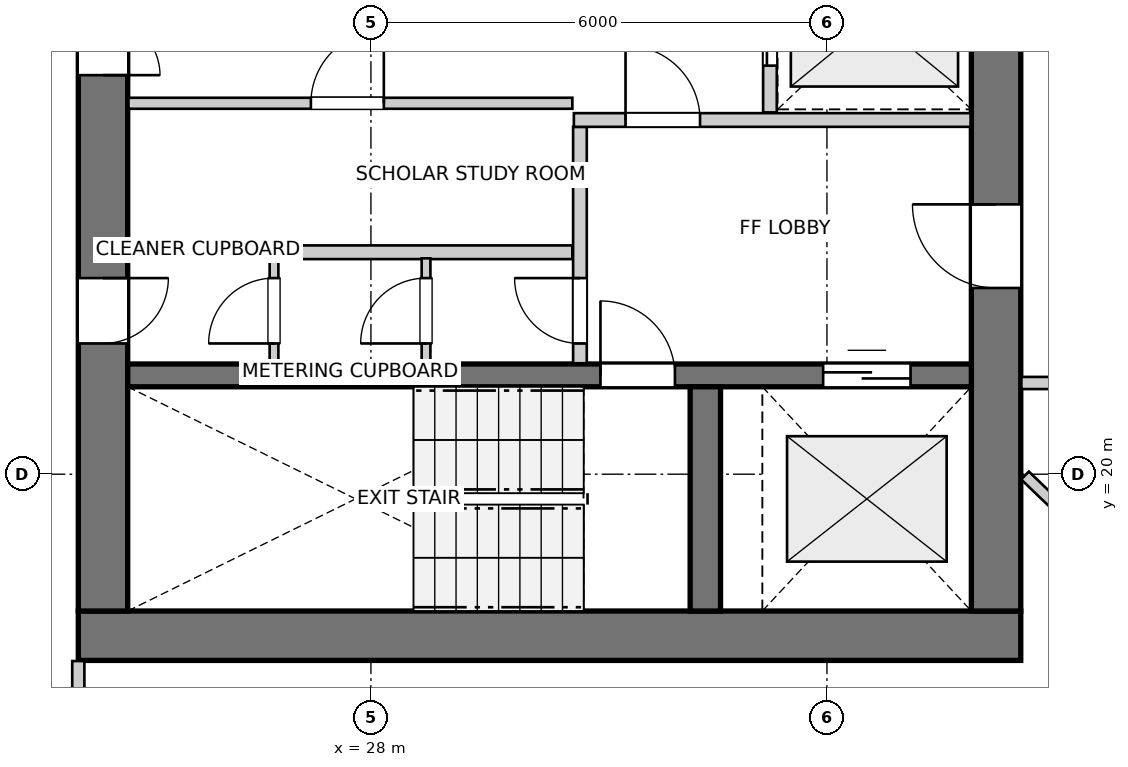
"""IFC4 building model, lengths in metres.
Left out: names, types, materials, properties, quantities, classifications, styles, units other than length and angle.
Written with IfcOpenShell. Run it as: python <this file> out.ifc"""

import sys

from ifc_helpers import new_model, si_unit, direction, frame, frame_2d, origin, place, context, subcontext, project, spatial, rectangle, extrude, source, transform, mapped, element, fill, save


model = new_model("IFC4")
c1 = context("Model", 3, precision=1e-05, world=origin(), true_north=direction((0.0, 1.0)))
c2 = subcontext(c1, "Body", "Model", "MODEL_VIEW")
j1 = project(units=[si_unit("LENGTHUNIT", "METRE"), si_unit("PLANEANGLEUNIT", "RADIAN")], contexts=[c1])
p1 = place(None, origin())
s1 = spatial("IfcSite", under=j1, at=p1, CompositionType="ELEMENT")
p2 = place(p1, origin())
s2 = spatial("IfcBuilding", under=s1, at=p2, CompositionType="ELEMENT")
p3 = place(p2, frame((0.0, 0.0, 152.2)))
s3 = spatial("IfcBuildingStorey", under=s2, at=p3, CompositionType="ELEMENT", Elevation=152.2)
p4 = place(p3, frame((24.15, 17.875, 0.0), z_axis=(0.0, 0.0, 1.0), x_axis=(1.0, 0.0, 0.0)))
e1 = element("IfcWall", 1, at=p4, inside=s3, PredefinedType="SHEAR", context=c2, shape_type="SweptSolid", body=[
    extrude(rectangle(XDim=12.4, YDim=0.65, at=frame_2d((6.2, 0.0))), origin(), (0.0, 0.0, 1.0), 2.935),
])
p5 = place(p3, frame((24.475, 33.8, 0.0), z_axis=(0.0, 0.0, 1.0), x_axis=(0.0, -1.0, 0.0)))
e2 = element("IfcWall", 2, at=p5, inside=s3, PredefinedType="SHEAR", context=c2, shape_type="SweptSolid", body=[
    extrude(rectangle(XDim=15.6, YDim=0.65, at=frame_2d((7.8, 0.0))), origin(), (0.0, 0.0, 1.0), 2.935),
])
p6 = place(p5, frame((7.05, 0.0, 0.0)))
e3 = element("IfcOpeningElement", 3, at=p6, cuts=e2, PredefinedType="OPENING", context=c2, shape_type="SweptSolid", body=[
    extrude(rectangle(XDim=1.5, YDim=2.15, at=frame_2d((0.75, 1.075))), frame((0.0, 0.335, 0.0), z_axis=(0.0, -1.0, 0.0), x_axis=(1.0, 0.0, 0.0)), (0.0, 0.0, 1.0), 0.67),
])
p7 = place(p5, frame((3.52, 0.0, 0.0)))
e4 = element("IfcOpeningElement", 4, at=p7, cuts=e2, PredefinedType="OPENING", context=c2, shape_type="SweptSolid", body=[
    extrude(rectangle(XDim=0.86, YDim=2.05, at=frame_2d((0.43, 1.025))), frame((0.0, 0.335, 0.0), z_axis=(0.0, -1.0, 0.0), x_axis=(1.0, 0.0, 0.0)), (0.0, 0.0, 1.0), 0.67),
])
p8 = place(p5, frame((11.22, 0.0, 0.0)))
e5 = element("IfcOpeningElement", 5, at=p8, cuts=e2, PredefinedType="OPENING", context=c2, shape_type="SweptSolid", body=[
    extrude(rectangle(XDim=0.86, YDim=2.05, at=frame_2d((0.43, 1.025))), frame((0.0, 0.335, 0.0), z_axis=(0.0, -1.0, 0.0), x_axis=(1.0, 0.0, 0.0)), (0.0, 0.0, 1.0), 0.67),
])
p9 = place(p3, frame((36.225, 18.2, 0.0), z_axis=(0.0, 0.0, 1.0), x_axis=(0.0, 1.0, 0.0)))
e6 = element("IfcWall", 6, at=p9, inside=s3, PredefinedType="SHEAR", context=c2, shape_type="SweptSolid", body=[
    extrude(rectangle(XDim=15.6, YDim=0.65, at=frame_2d((7.8, 0.0))), origin(), (0.0, 0.0, 1.0), 2.935),
])
p10 = place(p9, frame((4.25, 0.0, 0.0)))
e7 = element("IfcOpeningElement", 7, at=p10, cuts=e6, PredefinedType="OPENING", context=c2, shape_type="SweptSolid", body=[
    extrude(rectangle(XDim=1.1, YDim=2.15, at=frame_2d((0.55, 1.075))), frame((0.0, 0.335, 0.0), z_axis=(0.0, -1.0, 0.0), x_axis=(1.0, 0.0, 0.0)), (0.0, 0.0, 1.0), 0.67),
])
p11 = place(p9, frame((10.25, 0.0, 0.0)))
e8 = element("IfcOpeningElement", 8, at=p11, cuts=e6, PredefinedType="OPENING", context=c2, shape_type="SweptSolid", body=[
    extrude(rectangle(XDim=1.1, YDim=2.15, at=frame_2d((0.55, 1.075))), frame((0.0, 0.335, 0.0), z_axis=(0.0, -1.0, 0.0), x_axis=(1.0, 0.0, 0.0)), (0.0, 0.0, 1.0), 0.67),
])
p12 = place(p3, frame((24.8, 21.3, 0.0), z_axis=(0.0, 0.0, 1.0), x_axis=(1.0, 0.0, 0.0)))
e9 = element("IfcWall", 9, at=p12, inside=s3, PredefinedType="SHEAR", context=c2, shape_type="SweptSolid", body=[
    extrude(rectangle(XDim=11.1, YDim=0.3, at=frame_2d((5.55, 0.0))), origin(), (0.0, 0.0, 1.0), 2.935),
])
p13 = place(p12, frame((6.22, 0.0, 0.0)))
e10 = element("IfcOpeningElement", 10, at=p13, cuts=e9, PredefinedType="OPENING", context=c2, shape_type="SweptSolid", body=[
    extrude(rectangle(XDim=0.98, YDim=2.15, at=frame_2d((0.49, 1.075))), frame((0.0, 0.16, 0.0), z_axis=(0.0, -1.0, 0.0), x_axis=(1.0, 0.0, 0.0)), (0.0, 0.0, 1.0), 0.32),
])
p14 = place(p12, frame((9.15, 0.0, 0.0)))
e11 = element("IfcOpeningElement", 11, at=p14, cuts=e9, PredefinedType="OPENING", context=c2, shape_type="SweptSolid", body=[
    extrude(rectangle(XDim=1.15, YDim=2.15, at=frame_2d((0.575, 1.075))), frame((0.0, 0.16, 0.0), z_axis=(0.0, -1.0, 0.0), x_axis=(1.0, 0.0, 0.0)), (0.0, 0.0, 1.0), 0.32),
])
p15 = place(p3, frame((32.4, 18.2, 0.0), z_axis=(0.0, 0.0, 1.0), x_axis=(0.0, 1.0, 0.0)))
e12 = element("IfcWall", 12, at=p15, inside=s3, PredefinedType="SHEAR", context=c2, shape_type="SweptSolid", body=[
    extrude(rectangle(XDim=2.95, YDim=0.4, at=frame_2d((1.475, 0.0))), origin(), (0.0, 0.0, 1.0), 2.935),
])
p16 = place(p3, frame((30.75, 21.46, 0.0), z_axis=(0.0, 0.0, 1.0), x_axis=(0.0, 1.0, 0.0)))
e13 = element("IfcWall", 13, at=p16, inside=s3, PredefinedType="PARTITIONING", context=c2, shape_type="SweptSolid", body=[
    extrude(rectangle(XDim=3.11, YDim=0.18, at=frame_2d((1.555, 0.0))), origin(), (0.0, 0.0, 1.0), 2.935),
])
p17 = place(p16, frame((0.26, 0.0, 0.0)))
e14 = element("IfcOpeningElement", 14, at=p17, cuts=e13, PredefinedType="OPENING", context=c2, shape_type="SweptSolid", body=[
    extrude(rectangle(XDim=0.86, YDim=2.05, at=frame_2d((0.43, 1.025))), frame((0.0, 0.1, 0.0), z_axis=(0.0, -1.0, 0.0), x_axis=(1.0, 0.0, 0.0)), (0.0, 0.0, 1.0), 0.2),
])
p18 = place(p3, frame((30.67, 24.66, 0.0), z_axis=(0.0, 0.0, 1.0), x_axis=(1.0, 0.0, 0.0)))
e15 = element("IfcWall", 15, at=p18, inside=s3, PredefinedType="PARTITIONING", context=c2, shape_type="SweptSolid", body=[
    extrude(rectangle(XDim=5.22, YDim=0.18, at=frame_2d((2.61, 0.0))), origin(), (0.0, 0.0, 1.0), 2.935),
])
p19 = place(p18, frame((0.68, 0.0, 0.0)))
e16 = element("IfcOpeningElement", 16, at=p19, cuts=e15, PredefinedType="OPENING", context=c2, shape_type="SweptSolid", body=[
    extrude(rectangle(XDim=0.98, YDim=2.15, at=frame_2d((0.49, 1.075))), frame((0.0, 0.1, 0.0), z_axis=(0.0, -1.0, 0.0), x_axis=(1.0, 0.0, 0.0)), (0.0, 0.0, 1.0), 0.2),
])
p20 = place(p3, frame((33.25, 24.76, 0.0), z_axis=(0.0, 0.0, 1.0), x_axis=(0.0, 1.0, 0.0)))
e17 = element("IfcWall", 17, at=p20, inside=s3, PredefinedType="PARTITIONING", context=c2, shape_type="SweptSolid", body=[
    extrude(rectangle(XDim=2.48, YDim=0.18, at=frame_2d((1.24, 0.0))), origin(), (0.0, 0.0, 1.0), 2.935),
])
p21 = place(p20, frame((0.615, 0.0, 0.0)))
e18 = element("IfcOpeningElement", 18, at=p21, cuts=e17, PredefinedType="OPENING", context=c2, shape_type="SweptSolid", body=[
    extrude(rectangle(XDim=1.25, YDim=2.15, at=frame_2d((0.625, 1.075))), frame((0.0, 0.1, 0.0), z_axis=(0.0, -1.0, 0.0), x_axis=(1.0, 0.0, 0.0)), (0.0, 0.0, 1.0), 0.2),
])
p22 = place(p3, frame((24.81, 22.92, 0.0), z_axis=(0.0, 0.0, 1.0), x_axis=(1.0, 0.0, 0.0)))
e19 = element("IfcWall", 19, at=p22, inside=s3, PredefinedType="PARTITIONING", context=c2, shape_type="SweptSolid", body=[
    extrude(rectangle(XDim=5.84, YDim=0.18, at=frame_2d((2.92, 0.0))), origin(), (0.0, 0.0, 1.0), 2.935),
])
p23 = place(p3, frame((24.81, 24.88, 0.0), z_axis=(0.0, 0.0, 1.0), x_axis=(1.0, 0.0, 0.0)))
e20 = element("IfcWall", 20, at=p23, inside=s3, PredefinedType="PARTITIONING", context=c2, shape_type="SweptSolid", body=[
    extrude(rectangle(XDim=5.84, YDim=0.145, at=frame_2d((2.92, 0.0))), origin(), (0.0, 0.0, 1.0), 2.935),
])
p24 = place(p23, frame((2.4, 0.0, 0.0)))
e21 = element("IfcOpeningElement", 21, at=p24, cuts=e20, PredefinedType="OPENING", context=c2, shape_type="SweptSolid", body=[
    extrude(rectangle(XDim=0.96, YDim=2.1, at=frame_2d((0.48, 1.05))), frame((0.0, 0.083, 0.0), z_axis=(0.0, -1.0, 0.0), x_axis=(1.0, 0.0, 0.0)), (0.0, 0.0, 1.0), 0.165),
])
p25 = place(p3, frame((26.725, 21.46, 0.0), z_axis=(0.0, 0.0, 1.0), x_axis=(0.0, 1.0, 0.0)))
e22 = element("IfcWall", 22, at=p25, inside=s3, PredefinedType="PARTITIONING", context=c2, shape_type="SweptSolid", body=[
    extrude(rectangle(XDim=1.38, YDim=0.115, at=frame_2d((0.69, 0.0))), origin(), (0.0, 0.0, 1.0), 2.935),
])
p26 = place(p25, frame((0.26, 0.0, 0.0)))
e23 = element("IfcOpeningElement", 23, at=p26, cuts=e22, PredefinedType="OPENING", context=c2, shape_type="SweptSolid", body=[
    extrude(rectangle(XDim=0.86, YDim=2.05, at=frame_2d((0.43, 1.025))), frame((0.0, 0.067, 0.0), z_axis=(0.0, -1.0, 0.0), x_axis=(1.0, 0.0, 0.0)), (0.0, 0.0, 1.0), 0.135),
])
p27 = place(p3, frame((28.725, 21.46, 0.0), z_axis=(0.0, 0.0, 1.0), x_axis=(0.0, 1.0, 0.0)))
e24 = element("IfcWall", 24, at=p27, inside=s3, PredefinedType="PARTITIONING", context=c2, shape_type="SweptSolid", body=[
    extrude(rectangle(XDim=1.38, YDim=0.115, at=frame_2d((0.69, 0.0))), origin(), (0.0, 0.0, 1.0), 2.935),
])
p28 = place(p27, frame((0.26, 0.0, 0.0)))
e25 = element("IfcOpeningElement", 25, at=p28, cuts=e24, PredefinedType="OPENING", context=c2, shape_type="SweptSolid", body=[
    extrude(rectangle(XDim=0.86, YDim=2.05, at=frame_2d((0.43, 1.025))), frame((0.0, 0.067, 0.0), z_axis=(0.0, -1.0, 0.0), x_axis=(1.0, 0.0, 0.0)), (0.0, 0.0, 1.0), 0.135),
])
p29 = place(p3, frame((24.15, 17.542, 0.0), z_axis=(0.0, 0.0, 1.0), x_axis=(0.0, -1.0, 0.0)))
e26 = element("IfcWall", 26, at=p29, inside=s3, PredefinedType="PARTITIONING", context=c2, shape_type="SweptSolid", body=[
    extrude(rectangle(XDim=3.945, YDim=0.16, at=frame_2d((1.973, 0.0))), origin(), (0.0, 0.0, 1.0), 2.935),
])
p30 = place(p29, frame((1.319, 0.0, 0.0)))
e27 = element("IfcOpeningElement", 27, at=p30, cuts=e26, PredefinedType="OPENING", context=c2, shape_type="SweptSolid", body=[
    extrude(rectangle(XDim=1.3, YDim=2.1, at=frame_2d((0.65, 1.05))), frame((0.0, 0.09, 0.0), z_axis=(0.0, -1.0, 0.0), x_axis=(1.0, 0.0, 0.0)), (0.0, 0.0, 1.0), 0.18),
])
p31 = place(p3, frame((36.606, 19.983, 0.0), z_axis=(0.0, 0.0, 1.0), x_axis=(0.720776649136, -0.69316738387, 0.0)))
e28 = element("IfcWall", 28, at=p31, inside=s3, PredefinedType="PARTITIONING", context=c2, shape_type="SweptSolid", body=[
    extrude(rectangle(XDim=7.401, YDim=0.145, at=frame_2d((3.701, 0.0))), origin(), (0.0, 0.0, 1.0), 2.935),
])
p32 = place(p3, frame((36.558, 21.2, 0.0), z_axis=(0.0, 0.0, 1.0), x_axis=(1.0, 0.0, 0.0)))
e29 = element("IfcWall", 29, at=p32, inside=s3, PredefinedType="PARTITIONING", context=c2, shape_type="SweptSolid", body=[
    extrude(rectangle(XDim=1.684, YDim=0.16, at=frame_2d((0.842, 0.0))), origin(), (0.0, 0.0, 1.0), 2.935),
])
m1 = source(origin(), c2, "Body", "SweptSolid", [
    extrude(rectangle(XDim=0.98, YDim=2.15, at=frame_2d((0.49, 1.075))), frame((0.0, 0.025, 0.0), z_axis=(0.0, -1.0, 0.0), x_axis=(1.0, 0.0, 0.0)), (0.0, 0.0, 1.0), 0.05),
])
p33 = place(p13, origin())
e30 = element("IfcDoor", 30, at=p33, inside=s3, OperationType="SINGLE_SWING_LEFT", PredefinedType="DOOR", context=c2, shape_type="MappedRepresentation", body=[
    mapped(m1, transform((0.0, 0.0, 0.0), x_axis=(1.0, 0.0, 0.0), y_axis=(0.0, 1.0, 0.0), z_axis=(0.0, 0.0, 1.0), scale=1.0)),
])
fill(e10, e30)
m2 = source(origin(), c2, "Body", "SweptSolid", [
    extrude(rectangle(XDim=1.15, YDim=2.15, at=frame_2d((0.575, 1.075))), frame((0.0, 0.025, 0.0), z_axis=(0.0, -1.0, 0.0), x_axis=(1.0, 0.0, 0.0)), (0.0, 0.0, 1.0), 0.05),
])
p34 = place(p14, origin())
e31 = element("IfcDoor", 31, at=p34, inside=s3, OperationType="DOUBLE_DOOR_SLIDING", PredefinedType="DOOR", context=c2, shape_type="MappedRepresentation", body=[
    mapped(m2, transform((0.0, 0.0, 0.0), x_axis=(1.0, 0.0, 0.0), y_axis=(0.0, 1.0, 0.0), z_axis=(0.0, 0.0, 1.0), scale=1.0)),
])
fill(e11, e31)
m3 = source(origin(), c2, "Body", "SweptSolid", [
    extrude(rectangle(XDim=1.1, YDim=2.15, at=frame_2d((0.55, 1.075))), frame((0.0, 0.025, 0.0), z_axis=(0.0, -1.0, 0.0), x_axis=(1.0, 0.0, 0.0)), (0.0, 0.0, 1.0), 0.05),
])
p35 = place(p10, origin())
e32 = element("IfcDoor", 32, at=p35, inside=s3, OperationType="SINGLE_SWING_RIGHT", PredefinedType="DOOR", context=c2, shape_type="MappedRepresentation", body=[
    mapped(m3, transform((0.0, 0.0, 0.0), x_axis=(1.0, 0.0, 0.0), y_axis=(0.0, 1.0, 0.0), z_axis=(0.0, 0.0, 1.0), scale=1.0)),
])
fill(e7, e32)
m4 = source(origin(), c2, "Body", "SweptSolid", [
    extrude(rectangle(XDim=1.5, YDim=2.15, at=frame_2d((0.75, 1.075))), frame((0.0, 0.025, 0.0), z_axis=(0.0, -1.0, 0.0), x_axis=(1.0, 0.0, 0.0)), (0.0, 0.0, 1.0), 0.05),
])
p36 = place(p6, origin())
e33 = element("IfcDoor", 33, at=p36, inside=s3, OperationType="DOUBLE_DOOR_SINGLE_SWING", PredefinedType="DOOR", context=c2, shape_type="MappedRepresentation", body=[
    mapped(m4, transform((0.0, 0.0, 0.0), x_axis=(1.0, 0.0, 0.0), y_axis=(0.0, 1.0, 0.0), z_axis=(0.0, 0.0, 1.0), scale=1.0)),
])
fill(e3, e33)
m5 = source(origin(), c2, "Body", "SweptSolid", [
    extrude(rectangle(XDim=0.86, YDim=2.05, at=frame_2d((0.43, 1.025))), frame((0.0, 0.025, 0.0), z_axis=(0.0, -1.0, 0.0), x_axis=(1.0, 0.0, 0.0)), (0.0, 0.0, 1.0), 0.05),
])
p37 = place(p8, origin())
e34 = element("IfcDoor", 34, at=p37, inside=s3, OperationType="SINGLE_SWING_LEFT", PredefinedType="DOOR", context=c2, shape_type="MappedRepresentation", body=[
    mapped(m5, transform((0.0, 0.0, 0.0), x_axis=(1.0, 0.0, 0.0), y_axis=(0.0, 1.0, 0.0), z_axis=(0.0, 0.0, 1.0), scale=1.0)),
])
fill(e5, e34)
p38 = place(p17, origin())
e35 = element("IfcDoor", 35, at=p38, inside=s3, OperationType="SINGLE_SWING_RIGHT", PredefinedType="DOOR", context=c2, shape_type="MappedRepresentation", body=[
    mapped(m5, transform((0.0, 0.0, 0.0), x_axis=(1.0, 0.0, 0.0), y_axis=(0.0, 1.0, 0.0), z_axis=(0.0, 0.0, 1.0), scale=1.0)),
])
fill(e14, e35)
p39 = place(p19, origin())
e36 = element("IfcDoor", 36, at=p39, inside=s3, OperationType="SINGLE_SWING_LEFT", PredefinedType="DOOR", context=c2, shape_type="MappedRepresentation", body=[
    mapped(m1, transform((0.0, 0.0, 0.0), x_axis=(1.0, 0.0, 0.0), y_axis=(0.0, 1.0, 0.0), z_axis=(0.0, 0.0, 1.0), scale=1.0)),
])
fill(e16, e36)
m6 = source(origin(), c2, "Body", "SweptSolid", [
    extrude(rectangle(XDim=1.25, YDim=2.15, at=frame_2d((0.625, 1.075))), frame((0.0, 0.025, 0.0), z_axis=(0.0, -1.0, 0.0), x_axis=(1.0, 0.0, 0.0)), (0.0, 0.0, 1.0), 0.05),
])
p40 = place(p21, origin())
e37 = element("IfcDoor", 37, at=p40, inside=s3, OperationType="DOUBLE_DOOR_SLIDING", PredefinedType="DOOR", context=c2, shape_type="MappedRepresentation", body=[
    mapped(m6, transform((0.0, 0.0, 0.0), x_axis=(1.0, 0.0, 0.0), y_axis=(0.0, 1.0, 0.0), z_axis=(0.0, 0.0, 1.0), scale=1.0)),
])
fill(e18, e37)
m7 = source(origin(), c2, "Body", "SweptSolid", [
    extrude(rectangle(XDim=0.96, YDim=2.1, at=frame_2d((0.48, 1.05))), frame((0.0, 0.025, 0.0), z_axis=(0.0, -1.0, 0.0), x_axis=(1.0, 0.0, 0.0)), (0.0, 0.0, 1.0), 0.05),
])
p41 = place(p24, origin())
e38 = element("IfcDoor", 38, at=p41, inside=s3, OperationType="SINGLE_SWING_RIGHT", PredefinedType="DOOR", context=c2, shape_type="MappedRepresentation", body=[
    mapped(m7, transform((0.0, 0.0, 0.0), x_axis=(1.0, 0.0, 0.0), y_axis=(0.0, 1.0, 0.0), z_axis=(0.0, 0.0, 1.0), scale=1.0)),
])
fill(e21, e38)
p42 = place(p26, origin())
e39 = element("IfcDoor", 39, at=p42, inside=s3, OperationType="SINGLE_SWING_LEFT", PredefinedType="DOOR", context=c2, shape_type="MappedRepresentation", body=[
    mapped(m5, transform((0.0, 0.0, 0.0), x_axis=(1.0, 0.0, 0.0), y_axis=(0.0, 1.0, 0.0), z_axis=(0.0, 0.0, 1.0), scale=1.0)),
])
fill(e23, e39)
p43 = place(p28, origin())
e40 = element("IfcDoor", 40, at=p43, inside=s3, OperationType="SINGLE_SWING_LEFT", PredefinedType="DOOR", context=c2, shape_type="MappedRepresentation", body=[
    mapped(m5, transform((0.0, 0.0, 0.0), x_axis=(1.0, 0.0, 0.0), y_axis=(0.0, 1.0, 0.0), z_axis=(0.0, 0.0, 1.0), scale=1.0)),
])
fill(e25, e40)
save(model, sys.argv[1])
